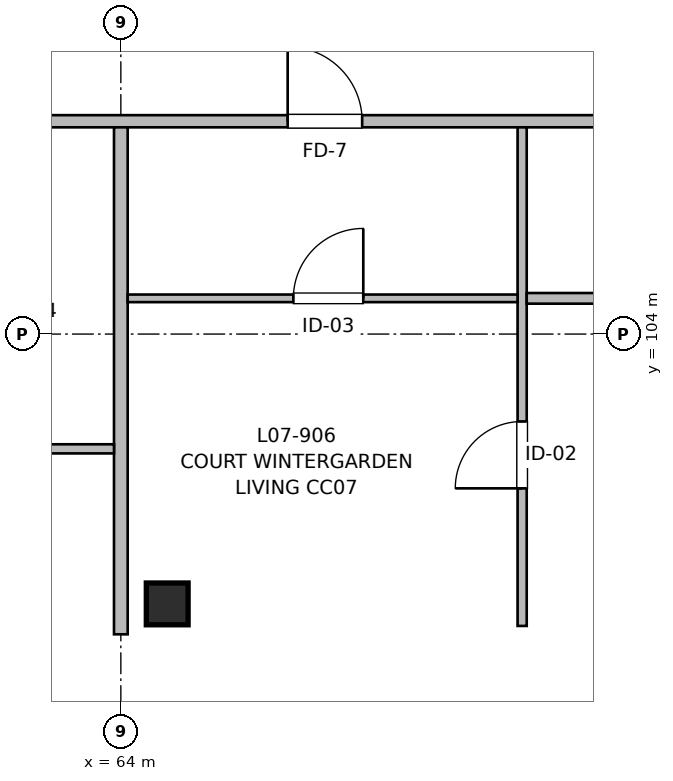
"""IFC4 building model, lengths in metres.
Left out: names, types, materials, properties, quantities, classifications, styles, units other than length and angle.
Written with IfcOpenShell. Run it as: python <this file> out.ifc"""

import sys

from ifc_helpers import new_model, si_unit, direction, frame, frame_2d, origin, origin_2d, place, context, subcontext, project, spatial, rectangle, extrude, element, fill, save


model = new_model("IFC4")
c1 = context("Model", 3, precision=1e-05, world=origin(), true_north=direction((0.0, 1.0)))
c2 = subcontext(c1, "Body", "Model", "MODEL_VIEW")
j1 = project(units=[si_unit("LENGTHUNIT", "METRE"), si_unit("PLANEANGLEUNIT", "RADIAN")], contexts=[c1])
p1 = place(None, origin())
s1 = spatial("IfcSite", under=j1, at=p1, CompositionType="ELEMENT")
p2 = place(p1, origin())
s2 = spatial("IfcBuilding", under=s1, at=p2, CompositionType="ELEMENT")
p3 = place(p2, frame((0.0, 0.0, 23.36)))
s3 = spatial("IfcBuildingStorey", under=s2, at=p3, CompositionType="ELEMENT", Elevation=23.36)
p4 = place(p3, frame((64.61, 100.45, 0.0), z_axis=(0.0, 0.0, 1.0), x_axis=(1.0, 0.0, 0.0)))
e1 = element("IfcColumn", 1, at=p4, inside=s3, PredefinedType="COLUMN", context=c2, shape_type="SweptSolid", body=[
    extrude(rectangle(XDim=0.55, YDim=0.55, at=origin_2d()), origin(), (0.0, 0.0, 1.0), 3.2),
])
p5 = place(p3, frame((57.2, 106.8, 0.0), z_axis=(0.0, 0.0, 1.0), x_axis=(1.0, 0.0, 0.0)))
e2 = element("IfcWall", 2, at=p5, inside=s3, PredefinedType="PARTITIONING", context=c2, shape_type="SweptSolid", body=[
    extrude(rectangle(XDim=24.14, YDim=0.16, at=frame_2d((12.07, 0.0))), origin(), (0.0, 0.0, 1.0), 2.935),
])
p6 = place(p5, frame((19.575, 0.0, 0.0)))
e3 = element("IfcOpeningElement", 3, at=p6, cuts=e2, PredefinedType="OPENING", context=c2, shape_type="SweptSolid", body=[
    extrude(rectangle(XDim=1.05, YDim=2.15, at=frame_2d((0.525, 1.075))), frame((0.0, 0.09, 0.0), z_axis=(0.0, -1.0, 0.0), x_axis=(1.0, 0.0, 0.0)), (0.0, 0.0, 1.0), 0.18),
])
p7 = place(p5, frame((8.995, 0.0, 0.0)))
e4 = element("IfcOpeningElement", 4, at=p7, cuts=e2, PredefinedType="OPENING", context=c2, shape_type="SweptSolid", body=[
    extrude(rectangle(XDim=0.98, YDim=2.15, at=frame_2d((0.49, 1.075))), frame((0.0, 0.09, 0.0), z_axis=(0.0, -1.0, 0.0), x_axis=(1.0, 0.0, 0.0)), (0.0, 0.0, 1.0), 0.18),
])
p8 = place(p3, frame((64.0, 100.05, 0.0), z_axis=(0.0, 0.0, 1.0), x_axis=(0.0, 1.0, 0.0)))
e5 = element("IfcWall", 5, at=p8, inside=s3, PredefinedType="PARTITIONING", context=c2, shape_type="SweptSolid", body=[
    extrude(rectangle(XDim=6.67, YDim=0.18, at=frame_2d((3.335, 0.0))), origin(), (0.0, 0.0, 1.0), 2.935),
])
p9 = place(p3, frame((59.72, 102.49, 0.0), z_axis=(0.0, 0.0, 1.0), x_axis=(1.0, 0.0, 0.0)))
e6 = element("IfcWall", 6, at=p9, inside=s3, PredefinedType="PARTITIONING", context=c2, shape_type="SweptSolid", body=[
    extrude(rectangle(XDim=4.19, YDim=0.12, at=frame_2d((2.095, 0.0))), origin(), (0.0, 0.0, 1.0), 2.935),
])
p10 = place(p9, frame((1.655, 0.0, 0.0)))
e7 = element("IfcOpeningElement", 7, at=p10, cuts=e6, PredefinedType="OPENING", context=c2, shape_type="SweptSolid", body=[
    extrude(rectangle(XDim=0.88, YDim=2.1, at=frame_2d((0.44, 1.05))), frame((0.0, 0.07, 0.0), z_axis=(0.0, -1.0, 0.0), x_axis=(1.0, 0.0, 0.0)), (0.0, 0.0, 1.0), 0.14),
])
p11 = place(p3, frame((69.28, 100.16, 0.0), z_axis=(0.0, 0.0, 1.0), x_axis=(0.0, 1.0, 0.0)))
e8 = element("IfcWall", 8, at=p11, inside=s3, PredefinedType="PARTITIONING", context=c2, shape_type="SweptSolid", body=[
    extrude(rectangle(XDim=6.56, YDim=0.12, at=frame_2d((3.28, 0.0))), origin(), (0.0, 0.0, 1.0), 2.935),
])
p12 = place(p11, frame((1.81, 0.0, 0.0)))
e9 = element("IfcOpeningElement", 9, at=p12, cuts=e8, PredefinedType="OPENING", context=c2, shape_type="SweptSolid", body=[
    extrude(rectangle(XDim=0.88, YDim=2.1, at=frame_2d((0.44, 1.05))), frame((0.0, 0.07, 0.0), z_axis=(0.0, -1.0, 0.0), x_axis=(1.0, 0.0, 0.0)), (0.0, 0.0, 1.0), 0.14),
])
p13 = place(p3, frame((69.34, 104.47, 0.0), z_axis=(0.0, 0.0, 1.0), x_axis=(1.0, 0.0, 0.0)))
e10 = element("IfcWall", 10, at=p13, inside=s3, PredefinedType="PARTITIONING", context=c2, shape_type="SweptSolid", body=[
    extrude(rectangle(XDim=4.36, YDim=0.14, at=frame_2d((2.18, 0.0))), origin(), (0.0, 0.0, 1.0), 2.935),
])
p14 = place(p13, frame((1.856, 0.0, 0.0)))
e11 = element("IfcOpeningElement", 11, at=p14, cuts=e10, PredefinedType="OPENING", context=c2, shape_type="SweptSolid", body=[
    extrude(rectangle(XDim=0.86, YDim=2.1, at=frame_2d((0.43, 1.05))), frame((0.0, 0.08, 0.0), z_axis=(0.0, -1.0, 0.0), x_axis=(1.0, 0.0, 0.0)), (0.0, 0.0, 1.0), 0.16),
])
p15 = place(p3, frame((64.09, 104.47, 0.0), z_axis=(0.0, 0.0, 1.0), x_axis=(1.0, 0.0, 0.0)))
e12 = element("IfcWall", 12, at=p15, inside=s3, PredefinedType="PARTITIONING", context=c2, shape_type="SweptSolid", body=[
    extrude(rectangle(XDim=5.13, YDim=0.1, at=frame_2d((2.565, 0.0))), origin(), (0.0, 0.0, 1.0), 2.935),
])
p16 = place(p15, frame((2.18, 0.0, 0.0)))
e13 = element("IfcOpeningElement", 13, at=p16, cuts=e12, PredefinedType="OPENING", context=c2, shape_type="SweptSolid", body=[
    extrude(rectangle(XDim=0.92, YDim=2.1, at=frame_2d((0.46, 1.05))), frame((0.0, 0.06, 0.0), z_axis=(0.0, -1.0, 0.0), x_axis=(1.0, 0.0, 0.0)), (0.0, 0.0, 1.0), 0.12),
])
p17 = place(p7, origin())
e14 = element("IfcDoor", 14, at=p17, inside=s3, OperationType="SINGLE_SWING_LEFT", PredefinedType="DOOR", context=c2, shape_type="SweptSolid", body=[
    extrude(rectangle(XDim=0.98, YDim=2.15, at=frame_2d((0.49, 1.075))), frame((0.0, 0.025, 0.0), z_axis=(0.0, -1.0, 0.0), x_axis=(1.0, 0.0, 0.0)), (0.0, 0.0, 1.0), 0.05),
])
fill(e4, e14)
p18 = place(p16, origin())
e15 = element("IfcDoor", 15, at=p18, inside=s3, OperationType="SINGLE_SWING_RIGHT", PredefinedType="DOOR", context=c2, shape_type="SweptSolid", body=[
    extrude(rectangle(XDim=0.92, YDim=2.1, at=frame_2d((0.46, 1.05))), frame((0.0, 0.025, 0.0), z_axis=(0.0, -1.0, 0.0), x_axis=(1.0, 0.0, 0.0)), (0.0, 0.0, 1.0), 0.05),
])
fill(e13, e15)
p19 = place(p12, origin())
e16 = element("IfcDoor", 16, at=p19, inside=s3, OperationType="SINGLE_SWING_LEFT", PredefinedType="DOOR", context=c2, shape_type="SweptSolid", body=[
    extrude(rectangle(XDim=0.88, YDim=2.1, at=frame_2d((0.44, 1.05))), frame((0.0, 0.025, 0.0), z_axis=(0.0, -1.0, 0.0), x_axis=(1.0, 0.0, 0.0)), (0.0, 0.0, 1.0), 0.05),
])
fill(e9, e16)
save(model, sys.argv[1])
